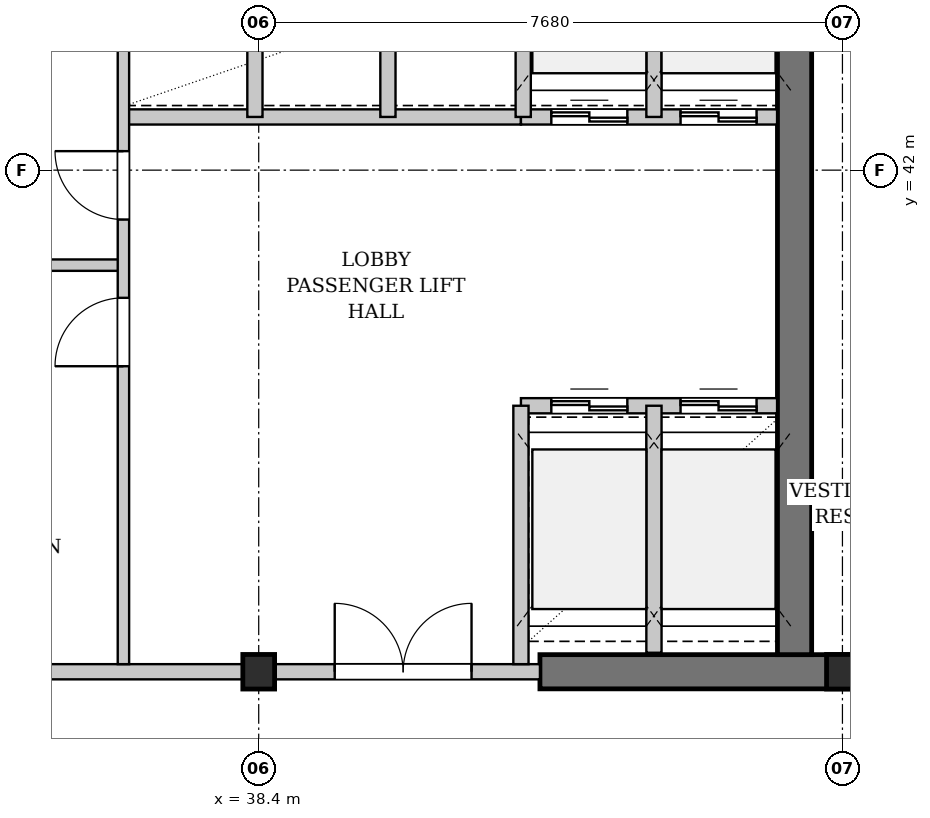
"""IFC4 building model, lengths in metres.
Left out: names, types, materials, properties, quantities, classifications, styles, units other than length and angle.
Written with IfcOpenShell. Run it as: python <this file> out.ifc"""

import sys

from ifc_helpers import new_model, si_unit, direction, frame, frame_2d, origin, origin_2d, place, context, subcontext, project, spatial, rectangle, i_section, extrude, element, fill, save


model = new_model("IFC4")
c1 = context("Model", 3, precision=1e-05, world=origin(), true_north=direction((0.0, 1.0)))
c2 = subcontext(c1, "Body", "Model", "MODEL_VIEW")
j1 = project(units=[si_unit("LENGTHUNIT", "METRE"), si_unit("PLANEANGLEUNIT", "RADIAN")], contexts=[c1])
p1 = place(None, origin())
s1 = spatial("IfcSite", under=j1, at=p1, CompositionType="ELEMENT")
p2 = place(p1, origin())
s2 = spatial("IfcBuilding", under=s1, at=p2, CompositionType="ELEMENT")
p3 = place(p2, frame((0.0, 0.0, 178.7)))
s3 = spatial("IfcBuildingStorey", under=s2, at=p3, CompositionType="ELEMENT", Elevation=178.7)
p4 = place(p3, frame((42.1, 35.4, 0.0), z_axis=(0.0, 0.0, 1.0), x_axis=(1.0, 0.0, 0.0)))
e1 = element("IfcWall", 1, at=p4, inside=s3, PredefinedType="SHEAR", context=c2, shape_type="SweptSolid", body=[
    extrude(rectangle(XDim=8.05, YDim=0.45, at=frame_2d((4.025, 0.0))), origin(), (0.0, 0.0, 1.0), 3.08),
])
p5 = place(p4, frame((4.85, 0.0, 0.0)))
e2 = element("IfcOpeningElement", 2, at=p5, cuts=e1, PredefinedType="OPENING", context=c2, shape_type="SweptSolid", body=[
    extrude(rectangle(XDim=0.9, YDim=2.15, at=frame_2d((0.45, 1.075))), frame((0.0, 0.235, 0.0), z_axis=(0.0, -1.0, 0.0), x_axis=(1.0, 0.0, 0.0)), (0.0, 0.0, 1.0), 0.47),
])
p6 = place(p3, frame((45.45, 35.625, 0.0), z_axis=(0.0, 0.0, 1.0), x_axis=(0.0, 1.0, 0.0)))
e3 = element("IfcWall", 3, at=p6, inside=s3, PredefinedType="SHEAR", context=c2, shape_type="SweptSolid", body=[
    extrude(rectangle(XDim=10.35, YDim=0.45, at=frame_2d((5.175, 0.0))), origin(), (0.0, 0.0, 1.0), 3.08),
])
for number, where, z_axis, x_axis in (
    (4, (38.4, 35.4, 0.0), (0.0, 0.0, 1.0), (1.0, 0.0, 0.0)),
    (5, (46.08, 35.4, 0.0), (0.0, 0.0, 1.0), (1.0, 0.0, 0.0)),
):
    element("IfcColumn", number, at=place(p3, frame(where, z_axis=z_axis, x_axis=x_axis)), inside=s3, PredefinedType="COLUMN", context=c2, shape_type="SweptSolid", body=[
        extrude(i_section(OverallWidth=0.418, OverallDepth=0.455, WebThickness=0.042, FlangeThickness=0.068, FilletRadius=0.015, at=origin_2d()), origin(), (0.0, 0.0, 1.0), 3.3),
    ])
p7 = place(p3, frame((35.6, 35.4, 0.0), z_axis=(0.0, 0.0, 1.0), x_axis=(1.0, 0.0, 0.0)))
e6 = element("IfcWall", 6, at=p7, inside=s3, PredefinedType="PARTITIONING", context=c2, shape_type="SweptSolid", body=[
    extrude(rectangle(XDim=6.5, YDim=0.2, at=frame_2d((3.25, 0.0))), origin(), (0.0, 0.0, 1.0), 2.475),
])
p8 = place(p7, frame((3.8, 0.0, 0.0)))
e7 = element("IfcOpeningElement", 7, at=p8, cuts=e6, PredefinedType="OPENING", context=c2, shape_type="SweptSolid", body=[
    extrude(rectangle(XDim=1.8, YDim=2.3, at=frame_2d((0.9, 1.15))), frame((0.0, 0.11, 0.0), z_axis=(0.0, -1.0, 0.0), x_axis=(1.0, 0.0, 0.0)), (0.0, 0.0, 1.0), 0.22),
])
p9 = place(p3, frame((36.6, 42.7, 0.0), z_axis=(0.0, 0.0, 1.0), x_axis=(1.0, 0.0, 0.0)))
e8 = element("IfcWall", 8, at=p9, inside=s3, PredefinedType="PARTITIONING", context=c2, shape_type="SweptSolid", body=[
    extrude(rectangle(XDim=5.25, YDim=0.2, at=frame_2d((2.625, 0.0))), origin(), (0.0, 0.0, 1.0), 3.08),
])
p10 = place(p3, frame((38.35, 42.7, 0.0), z_axis=(0.0, 0.0, 1.0), x_axis=(0.0, 1.0, 0.0)))
e9 = element("IfcWall", 9, at=p10, inside=s3, PredefinedType="PARTITIONING", context=c2, shape_type="SweptSolid", body=[
    extrude(rectangle(XDim=3.22, YDim=0.2, at=frame_2d((1.61, 0.0))), origin(), (0.0, 0.0, 1.0), 2.475),
])
p11 = place(p3, frame((40.1, 42.7, 0.0), z_axis=(0.0, 0.0, 1.0), x_axis=(0.0, 1.0, 0.0)))
e10 = element("IfcWall", 10, at=p11, inside=s3, PredefinedType="PARTITIONING", context=c2, shape_type="SweptSolid", body=[
    extrude(rectangle(XDim=3.22, YDim=0.2, at=frame_2d((1.61, 0.0))), origin(), (0.0, 0.0, 1.0), 3.08),
])
p12 = place(p3, frame((33.05, 40.75, 0.0), z_axis=(0.0, 0.0, 1.0), x_axis=(1.0, 0.0, 0.0)))
e11 = element("IfcWall", 11, at=p12, inside=s3, PredefinedType="PARTITIONING", context=c2, shape_type="SweptSolid", body=[
    extrude(rectangle(XDim=3.57, YDim=0.15, at=frame_2d((1.785, 0.0))), origin(), (0.0, 0.0, 1.0), 3.08),
])
p13 = place(p3, frame((36.62, 35.5, 0.0), z_axis=(0.0, 0.0, 1.0), x_axis=(0.0, 1.0, 0.0)))
e12 = element("IfcWall", 12, at=p13, inside=s3, PredefinedType="PARTITIONING", context=c2, shape_type="SweptSolid", body=[
    extrude(rectangle(XDim=10.42, YDim=0.15, at=frame_2d((5.21, 0.0))), origin(), (0.0, 0.0, 1.0), 3.08),
])
p14 = place(p13, frame((3.92, 0.0, 0.0)))
e13 = element("IfcOpeningElement", 13, at=p14, cuts=e12, PredefinedType="OPENING", context=c2, shape_type="SweptSolid", body=[
    extrude(rectangle(XDim=0.9, YDim=2.15, at=frame_2d((0.45, 1.075))), frame((0.0, 0.085, 0.0), z_axis=(0.0, -1.0, 0.0), x_axis=(1.0, 0.0, 0.0)), (0.0, 0.0, 1.0), 0.17),
])
p15 = place(p13, frame((5.85, 0.0, 0.0)))
e14 = element("IfcOpeningElement", 14, at=p15, cuts=e12, PredefinedType="OPENING", context=c2, shape_type="SweptSolid", body=[
    extrude(rectangle(XDim=0.9, YDim=2.15, at=frame_2d((0.45, 1.075))), frame((0.0, 0.085, 0.0), z_axis=(0.0, -1.0, 0.0), x_axis=(1.0, 0.0, 0.0)), (0.0, 0.0, 1.0), 0.17),
])
p16 = place(p3, frame((41.85, 38.9, 0.0), z_axis=(0.0, 0.0, 1.0), x_axis=(1.0, 0.0, 0.0)))
e15 = element("IfcWall", 15, at=p16, inside=s3, PredefinedType="PARTITIONING", context=c2, shape_type="SweptSolid", body=[
    extrude(rectangle(XDim=3.37, YDim=0.2, at=frame_2d((1.685, 0.0))), origin(), (0.0, 0.0, 1.0), 3.08),
])
p17 = place(p16, frame((0.4, 0.0, 0.0)))
e16 = element("IfcOpeningElement", 16, at=p17, cuts=e15, PredefinedType="OPENING", context=c2, shape_type="SweptSolid", body=[
    extrude(rectangle(XDim=1.0, YDim=2.2, at=frame_2d((0.5, 1.1))), frame((0.0, 0.11, 0.0), z_axis=(0.0, -1.0, 0.0), x_axis=(1.0, 0.0, 0.0)), (0.0, 0.0, 1.0), 0.22),
])
p18 = place(p16, frame((2.1, 0.0, 0.0)))
e17 = element("IfcOpeningElement", 17, at=p18, cuts=e15, PredefinedType="OPENING", context=c2, shape_type="SweptSolid", body=[
    extrude(rectangle(XDim=1.0, YDim=2.2, at=frame_2d((0.5, 1.1))), frame((0.0, 0.11, 0.0), z_axis=(0.0, -1.0, 0.0), x_axis=(1.0, 0.0, 0.0)), (0.0, 0.0, 1.0), 0.22),
])
p19 = place(p3, frame((41.85, 42.7, 0.0), z_axis=(0.0, 0.0, 1.0), x_axis=(1.0, 0.0, 0.0)))
e18 = element("IfcWall", 18, at=p19, inside=s3, PredefinedType="PARTITIONING", context=c2, shape_type="SweptSolid", body=[
    extrude(rectangle(XDim=3.37, YDim=0.2, at=frame_2d((1.685, 0.0))), origin(), (0.0, 0.0, 1.0), 3.08),
])
p20 = place(p19, frame((0.4, 0.0, 0.0)))
e19 = element("IfcOpeningElement", 19, at=p20, cuts=e18, PredefinedType="OPENING", context=c2, shape_type="SweptSolid", body=[
    extrude(rectangle(XDim=1.0, YDim=2.2, at=frame_2d((0.5, 1.1))), frame((0.0, 0.11, 0.0), z_axis=(0.0, -1.0, 0.0), x_axis=(1.0, 0.0, 0.0)), (0.0, 0.0, 1.0), 0.22),
])
p21 = place(p19, frame((2.1, 0.0, 0.0)))
e20 = element("IfcOpeningElement", 20, at=p21, cuts=e18, PredefinedType="OPENING", context=c2, shape_type="SweptSolid", body=[
    extrude(rectangle(XDim=1.0, YDim=2.2, at=frame_2d((0.5, 1.1))), frame((0.0, 0.11, 0.0), z_axis=(0.0, -1.0, 0.0), x_axis=(1.0, 0.0, 0.0)), (0.0, 0.0, 1.0), 0.22),
])
p22 = place(p3, frame((43.6, 35.65, 0.0), z_axis=(0.0, 0.0, 1.0), x_axis=(0.0, 1.0, 0.0)))
e21 = element("IfcWall", 21, at=p22, inside=s3, PredefinedType="PARTITIONING", context=c2, shape_type="SweptSolid", body=[
    extrude(rectangle(XDim=3.25, YDim=0.2, at=frame_2d((1.625, 0.0))), origin(), (0.0, 0.0, 1.0), 3.08),
])
p23 = place(p3, frame((43.6, 42.7, 0.0), z_axis=(0.0, 0.0, 1.0), x_axis=(0.0, 1.0, 0.0)))
e22 = element("IfcWall", 22, at=p23, inside=s3, PredefinedType="PARTITIONING", context=c2, shape_type="SweptSolid", body=[
    extrude(rectangle(XDim=3.22, YDim=0.2, at=frame_2d((1.61, 0.0))), origin(), (0.0, 0.0, 1.0), 3.08),
])
p24 = place(p3, frame((41.85, 35.5, 0.0), z_axis=(0.0, 0.0, 1.0), x_axis=(0.0, 1.0, 0.0)))
e23 = element("IfcWall", 23, at=p24, inside=s3, PredefinedType="PARTITIONING", context=c2, shape_type="SweptSolid", body=[
    extrude(rectangle(XDim=3.4, YDim=0.2, at=frame_2d((1.7, 0.0))), origin(), (0.0, 0.0, 1.0), 3.08),
])
p25 = place(p3, frame((41.88, 42.7, 0.0), z_axis=(0.0, 0.0, 1.0), x_axis=(0.0, 1.0, 0.0)))
e24 = element("IfcWall", 24, at=p25, inside=s3, PredefinedType="PARTITIONING", context=c2, shape_type="SweptSolid", body=[
    extrude(rectangle(XDim=3.22, YDim=0.2, at=frame_2d((1.61, 0.0))), origin(), (0.0, 0.0, 1.0), 3.08),
])
p26 = place(p8, origin())
e25 = element("IfcDoor", 25, at=p26, inside=s3, OperationType="DOUBLE_DOOR_SINGLE_SWING", PredefinedType="DOOR", context=c2, shape_type="SweptSolid", body=[
    extrude(rectangle(XDim=1.8, YDim=2.3, at=frame_2d((0.9, 1.15))), frame((0.0, 0.025, 0.0), z_axis=(0.0, -1.0, 0.0), x_axis=(1.0, 0.0, 0.0)), (0.0, 0.0, 1.0), 0.05),
])
fill(e7, e25)
p27 = place(p14, origin())
e26 = element("IfcDoor", 26, at=p27, inside=s3, OperationType="SINGLE_SWING_LEFT", PredefinedType="DOOR", context=c2, shape_type="SweptSolid", body=[
    extrude(rectangle(XDim=0.9, YDim=2.15, at=frame_2d((0.45, 1.075))), frame((0.0, 0.025, 0.0), z_axis=(0.0, -1.0, 0.0), x_axis=(1.0, 0.0, 0.0)), (0.0, 0.0, 1.0), 0.05),
])
fill(e13, e26)
p28 = place(p15, origin())
e27 = element("IfcDoor", 27, at=p28, inside=s3, OperationType="SINGLE_SWING_RIGHT", PredefinedType="DOOR", context=c2, shape_type="SweptSolid", body=[
    extrude(rectangle(XDim=0.9, YDim=2.15, at=frame_2d((0.45, 1.075))), frame((0.0, 0.025, 0.0), z_axis=(0.0, -1.0, 0.0), x_axis=(1.0, 0.0, 0.0)), (0.0, 0.0, 1.0), 0.05),
])
fill(e14, e27)
p29 = place(p17, origin())
e28 = element("IfcDoor", 28, at=p29, inside=s3, OperationType="DOUBLE_DOOR_SLIDING", PredefinedType="DOOR", context=c2, shape_type="SweptSolid", body=[
    extrude(rectangle(XDim=1.0, YDim=2.2, at=frame_2d((0.5, 1.1))), frame((0.0, 0.025, 0.0), z_axis=(0.0, -1.0, 0.0), x_axis=(1.0, 0.0, 0.0)), (0.0, 0.0, 1.0), 0.05),
])
fill(e16, e28)
p30 = place(p18, origin())
e29 = element("IfcDoor", 29, at=p30, inside=s3, OperationType="DOUBLE_DOOR_SLIDING", PredefinedType="DOOR", context=c2, shape_type="SweptSolid", body=[
    extrude(rectangle(XDim=1.0, YDim=2.2, at=frame_2d((0.5, 1.1))), frame((0.0, 0.025, 0.0), z_axis=(0.0, -1.0, 0.0), x_axis=(1.0, 0.0, 0.0)), (0.0, 0.0, 1.0), 0.05),
])
fill(e17, e29)
p31 = place(p20, origin())
e30 = element("IfcDoor", 30, at=p31, inside=s3, OperationType="DOUBLE_DOOR_SLIDING", PredefinedType="DOOR", context=c2, shape_type="SweptSolid", body=[
    extrude(rectangle(XDim=1.0, YDim=2.2, at=frame_2d((0.5, 1.1))), frame((0.0, 0.025, 0.0), z_axis=(0.0, -1.0, 0.0), x_axis=(1.0, 0.0, 0.0)), (0.0, 0.0, 1.0), 0.05),
])
fill(e19, e30)
p32 = place(p21, origin())
e31 = element("IfcDoor", 31, at=p32, inside=s3, OperationType="DOUBLE_DOOR_SLIDING", PredefinedType="DOOR", context=c2, shape_type="SweptSolid", body=[
    extrude(rectangle(XDim=1.0, YDim=2.2, at=frame_2d((0.5, 1.1))), frame((0.0, 0.025, 0.0), z_axis=(0.0, -1.0, 0.0), x_axis=(1.0, 0.0, 0.0)), (0.0, 0.0, 1.0), 0.05),
])
fill(e20, e31)
save(model, sys.argv[1])
